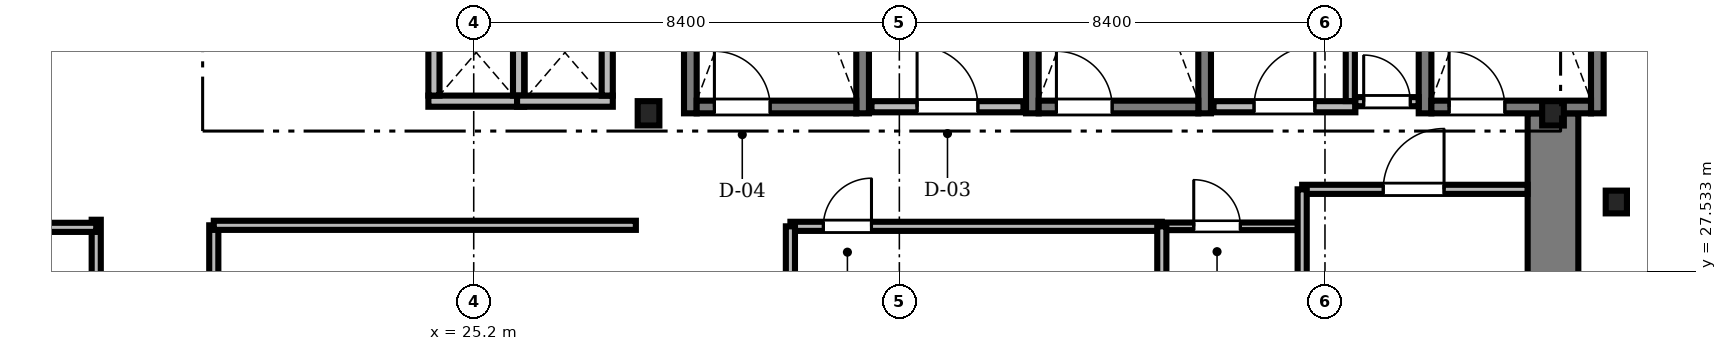
"""IFC4 building model, lengths in metres.
Left out: names, types, materials, properties, quantities, classifications, styles, units other than length and angle.
Written with IfcOpenShell. Run it as: python <this file> out.ifc"""

import sys

from ifc_helpers import new_model, si_unit, direction, frame, frame_2d, origin, origin_2d, place, context, subcontext, project, spatial, rectangle, i_section, extrude, source, transform, mapped, element, fill, save


model = new_model("IFC4")
c1 = context("Model", 3, precision=1e-05, world=origin(), true_north=direction((0.0, 1.0)))
c2 = subcontext(c1, "Body", "Model", "MODEL_VIEW")
j1 = project(units=[si_unit("LENGTHUNIT", "METRE"), si_unit("PLANEANGLEUNIT", "RADIAN")], contexts=[c1])
p1 = place(None, origin())
s1 = spatial("IfcSite", under=j1, at=p1, CompositionType="ELEMENT")
p2 = place(p1, origin())
s2 = spatial("IfcBuilding", under=s1, at=p2, CompositionType="ELEMENT")
p3 = place(p2, frame((0.0, 0.0, 27.6)))
s3 = spatial("IfcBuildingStorey", under=s2, at=p3, CompositionType="ELEMENT", Elevation=27.6)
m1 = source(origin(), c2, "Body", "SweptSolid", [
    extrude(rectangle(XDim=13.15, YDim=1.0, at=frame_2d((6.575, 0.0))), origin(), (0.0, 0.0, 1.0), 3.41),
])
p4 = place(p3, frame((46.5, 17.5, 0.0), z_axis=(0.0, 0.0, 1.0), x_axis=(0.0, 1.0, 0.0)))
e1 = element("IfcWall", 1, at=p4, inside=s3, PredefinedType="SHEAR", context=c2, shape_type="MappedRepresentation", body=[
    mapped(m1, transform((0.0, 0.0, 0.0), scale=1.0)),
])
m2 = source(origin(), c2, "Body", "SweptSolid", [
    extrude(i_section(OverallWidth=0.428, OverallDepth=0.481, WebThickness=0.04, FlangeThickness=0.063, FilletRadius=0.015, at=origin_2d()), origin(), (0.0, 0.0, 1.0), 3.41),
])
for number, where, z_axis, x_axis in (
    (2, (28.65, 30.65, 0.0), (0.0, 0.0, 1.0), (1.0, 0.0, 0.0)),
    (3, (46.5, 30.65, 0.0), (0.0, 0.0, 1.0), (1.0, 0.0, 0.0)),
):
    element("IfcColumn", number, at=place(p3, frame(where, z_axis=z_axis, x_axis=x_axis)), inside=s3, PredefinedType="COLUMN", context=c2, shape_type="MappedRepresentation", body=[
        mapped(m2, transform((0.0, 0.0, 0.0), scale=1.0)),
    ])
m3 = source(origin(), c2, "Body", "SweptSolid", [
    extrude(i_section(OverallWidth=0.419, OverallDepth=0.449, WebThickness=0.031, FlangeThickness=0.048, FilletRadius=0.015, at=origin_2d()), origin(), (0.0, 0.0, 1.0), 3.41),
])
p5 = place(p3, frame((47.75, 28.9, 0.0), z_axis=(0.0, 0.0, 1.0), x_axis=(1.0, 0.0, 0.0)))
e4 = element("IfcColumn", 4, at=p5, inside=s3, PredefinedType="COLUMN", context=c2, shape_type="MappedRepresentation", body=[
    mapped(m3, transform((0.0, 0.0, 0.0), scale=1.0)),
])
m4 = source(origin(), c2, "Body", "SweptSolid", [
    extrude(rectangle(XDim=9.15, YDim=0.25, at=frame_2d((4.575, 0.0))), origin(), (0.0, 0.0, 1.0), 3.45),
])
for number, where, z_axis, x_axis in (
    (5, (29.475, 30.65, 0.0), (0.0, 0.0, 1.0), (0.0, 1.0, 0.0)),
    (6, (32.875, 30.65, 0.0), (0.0, 0.0, 1.0), (0.0, 1.0, 0.0)),
):
    element("IfcWall", number, at=place(p3, frame(where, z_axis=z_axis, x_axis=x_axis)), inside=s3, PredefinedType="SOLIDWALL", context=c2, shape_type="MappedRepresentation", body=[
        mapped(m4, transform((0.0, 0.0, 0.0), scale=1.0)),
    ])
m5 = source(origin(), c2, "Body", "SweptSolid", [
    extrude(rectangle(XDim=3.15, YDim=0.25, at=frame_2d((1.575, 0.0))), origin(), (0.0, 0.0, 1.0), 3.45),
])
p6 = place(p3, frame((29.6, 30.775, 0.0), z_axis=(0.0, 0.0, 1.0), x_axis=(1.0, 0.0, 0.0)))
e7 = element("IfcWall", 7, at=p6, inside=s3, PredefinedType="SOLIDWALL", context=c2, shape_type="MappedRepresentation", body=[
    mapped(m5, transform((0.0, 0.0, 0.0), scale=1.0)),
])
m6 = source(origin(), c2, "Body", "SweptSolid", [
    extrude(rectangle(XDim=1.1, YDim=2.2, at=frame_2d((0.55, 1.1))), frame((0.0, 0.135, 0.0), z_axis=(0.0, -1.0, 0.0), x_axis=(1.0, 0.0, 0.0)), (0.0, 0.0, 1.0), 0.27),
])
p7 = place(p6, frame((0.35, 0.0, 0.0)))
e8 = element("IfcOpeningElement", 8, at=p7, cuts=e7, PredefinedType="OPENING", context=c2, shape_type="MappedRepresentation", body=[
    mapped(m6, transform((0.0, 0.0, 0.0), scale=1.0)),
])
for number, where, z_axis, x_axis in (
    (9, (36.225, 30.65, 0.0), (0.0, 0.0, 1.0), (0.0, 1.0, 0.0)),
    (10, (39.625, 30.65, 0.0), (0.0, 0.0, 1.0), (0.0, 1.0, 0.0)),
):
    element("IfcWall", number, at=place(p3, frame(where, z_axis=z_axis, x_axis=x_axis)), inside=s3, PredefinedType="SOLIDWALL", context=c2, shape_type="MappedRepresentation", body=[
        mapped(m4, transform((0.0, 0.0, 0.0), scale=1.0)),
    ])
p8 = place(p3, frame((36.35, 30.775, 0.0), z_axis=(0.0, 0.0, 1.0), x_axis=(1.0, 0.0, 0.0)))
e11 = element("IfcWall", 11, at=p8, inside=s3, PredefinedType="SOLIDWALL", context=c2, shape_type="MappedRepresentation", body=[
    mapped(m5, transform((0.0, 0.0, 0.0), scale=1.0)),
])
p9 = place(p8, frame((0.35, 0.0, 0.0)))
e12 = element("IfcOpeningElement", 12, at=p9, cuts=e11, PredefinedType="OPENING", context=c2, shape_type="MappedRepresentation", body=[
    mapped(m6, transform((0.0, 0.0, 0.0), scale=1.0)),
])
for number, where, z_axis, x_axis in (
    (13, (43.975, 30.65, 0.0), (0.0, 0.0, 1.0), (0.0, 1.0, 0.0)),
    (14, (47.375, 30.65, 0.0), (0.0, 0.0, 1.0), (0.0, 1.0, 0.0)),
):
    element("IfcWall", number, at=place(p3, frame(where, z_axis=z_axis, x_axis=x_axis)), inside=s3, PredefinedType="SOLIDWALL", context=c2, shape_type="MappedRepresentation", body=[
        mapped(m4, transform((0.0, 0.0, 0.0), scale=1.0)),
    ])
p10 = place(p3, frame((44.1, 30.775, 0.0), z_axis=(0.0, 0.0, 1.0), x_axis=(1.0, 0.0, 0.0)))
e15 = element("IfcWall", 15, at=p10, inside=s3, PredefinedType="SOLIDWALL", context=c2, shape_type="MappedRepresentation", body=[
    mapped(m5, transform((0.0, 0.0, 0.0), scale=1.0)),
])
p11 = place(p10, frame((0.35, 0.0, 0.0)))
e16 = element("IfcOpeningElement", 16, at=p11, cuts=e15, PredefinedType="OPENING", context=c2, shape_type="MappedRepresentation", body=[
    mapped(m6, transform((0.0, 0.0, 0.0), scale=1.0)),
])
m7 = source(origin(), c2, "Body", "SweptSolid", [
    extrude(rectangle(XDim=3.0, YDim=0.22, at=frame_2d((1.5, 0.0))), origin(), (0.0, 0.0, 1.0), 3.41),
])
p12 = place(p3, frame((33.05, 30.78, 0.0), z_axis=(0.0, 0.0, 1.0), x_axis=(1.0, 0.0, 0.0)))
e17 = element("IfcWall", 17, at=p12, inside=s3, PredefinedType="SOLIDWALL", context=c2, shape_type="MappedRepresentation", body=[
    mapped(m7, transform((0.0, 0.0, 0.0), scale=1.0)),
])
m8 = source(origin(), c2, "Body", "SweptSolid", [
    extrude(rectangle(XDim=1.2, YDim=2.2, at=frame_2d((0.6, 1.1))), frame((0.0, 0.12, 0.0), z_axis=(0.0, -1.0, 0.0), x_axis=(1.0, 0.0, 0.0)), (0.0, 0.0, 1.0), 0.24),
])
p13 = place(p12, frame((0.9, 0.0, 0.0)))
e18 = element("IfcOpeningElement", 18, at=p13, cuts=e17, PredefinedType="OPENING", context=c2, shape_type="MappedRepresentation", body=[
    mapped(m8, transform((0.0, 0.0, 0.0), scale=1.0)),
])
m9 = source(origin(), c2, "Body", "SweptSolid", [
    extrude(rectangle(XDim=2.8, YDim=0.22, at=frame_2d((1.4, 0.0))), origin(), (0.0, 0.0, 1.0), 3.41),
])
p14 = place(p3, frame((39.8, 30.78, 0.0), z_axis=(0.0, 0.0, 1.0), x_axis=(1.0, 0.0, 0.0)))
e19 = element("IfcWall", 19, at=p14, inside=s3, PredefinedType="SOLIDWALL", context=c2, shape_type="MappedRepresentation", body=[
    mapped(m9, transform((0.0, 0.0, 0.0), scale=1.0)),
])
p15 = place(p14, frame((0.8, 0.0, 0.0)))
e20 = element("IfcOpeningElement", 20, at=p15, cuts=e19, PredefinedType="OPENING", context=c2, shape_type="MappedRepresentation", body=[
    mapped(m8, transform((0.0, 0.0, 0.0), scale=1.0)),
])
m10 = source(origin(), c2, "Body", "SweptSolid", [
    extrude(rectangle(XDim=1.89, YDim=0.22, at=frame_2d((0.945, 0.0))), origin(), (0.0, 0.0, 1.0), 3.41),
])
p16 = place(p3, frame((24.305, 30.89, 0.0), z_axis=(0.0, 0.0, 1.0), x_axis=(1.0, 0.0, 0.0)))
e21 = element("IfcWall", 21, at=p16, inside=s3, PredefinedType="SOLIDWALL", context=c2, shape_type="MappedRepresentation", body=[
    mapped(m10, transform((0.0, 0.0, 0.0), scale=1.0)),
])
m11 = source(origin(), c2, "Body", "SweptSolid", [
    extrude(rectangle(XDim=1.7, YDim=0.22, at=frame_2d((0.85, 0.0))), origin(), (0.0, 0.0, 1.0), 3.41),
])
for number, where, z_axis, x_axis in (
    (22, (24.415, 31.0, 0.0), (0.0, 0.0, 1.0), (0.0, 1.0, 0.0)),
    (23, (26.085, 31.0, 0.0), (0.0, 0.0, 1.0), (0.0, 1.0, 0.0)),
):
    element("IfcWall", number, at=place(p3, frame(where, z_axis=z_axis, x_axis=x_axis)), inside=s3, PredefinedType="SOLIDWALL", context=c2, shape_type="MappedRepresentation", body=[
        mapped(m11, transform((0.0, 0.0, 0.0), scale=1.0)),
    ])
p17 = place(p3, frame((26.055, 30.89, 0.0), z_axis=(0.0, 0.0, 1.0), x_axis=(1.0, 0.0, 0.0)))
e24 = element("IfcWall", 24, at=p17, inside=s3, PredefinedType="SOLIDWALL", context=c2, shape_type="MappedRepresentation", body=[
    mapped(m10, transform((0.0, 0.0, 0.0), scale=1.0)),
])
p18 = place(p3, frame((27.835, 31.0, 0.0), z_axis=(0.0, 0.0, 1.0), x_axis=(0.0, 1.0, 0.0)))
e25 = element("IfcWall", 25, at=p18, inside=s3, PredefinedType="SOLIDWALL", context=c2, shape_type="MappedRepresentation", body=[
    mapped(m11, transform((0.0, 0.0, 0.0), scale=1.0)),
])
m12 = source(origin(), c2, "Body", "SweptSolid", [
    extrude(rectangle(XDim=13.89, YDim=0.18, at=frame_2d((6.945, 0.0))), origin(), (0.0, 0.0, 1.0), 2.802),
])
p19 = place(p3, frame((17.75, 14.66, 0.0), z_axis=(0.0, 0.0, 1.0), x_axis=(0.0, 1.0, 0.0)))
e26 = element("IfcWall", 26, at=p19, inside=s3, PredefinedType="PARTITIONING", context=c2, shape_type="MappedRepresentation", body=[
    mapped(m12, transform((0.0, 0.0, 0.0), scale=1.0)),
])
m13 = source(origin(), c2, "Body", "SweptSolid", [
    extrude(rectangle(XDim=1.05, YDim=2.2, at=frame_2d((0.525, 1.1))), frame((0.0, 0.1, 0.0), z_axis=(0.0, -1.0, 0.0), x_axis=(1.0, 0.0, 0.0)), (0.0, 0.0, 1.0), 0.2),
])
p20 = place(p19, frame((1.77, 0.0, 0.0)))
e27 = element("IfcOpeningElement", 27, at=p20, cuts=e26, PredefinedType="OPENING", context=c2, shape_type="MappedRepresentation", body=[
    mapped(m13, transform((0.0, 0.0, 0.0), scale=1.0)),
])
m14 = source(origin(), c2, "Body", "SweptSolid", [
    extrude(rectangle(XDim=0.95, YDim=2.15, at=frame_2d((0.475, 1.075))), frame((0.0, 0.1, 0.0), z_axis=(0.0, -1.0, 0.0), x_axis=(1.0, 0.0, 0.0)), (0.0, 0.0, 1.0), 0.2),
])
p21 = place(p19, frame((7.575, 0.0, 0.0)))
e28 = element("IfcOpeningElement", 28, at=p21, cuts=e26, PredefinedType="OPENING", context=c2, shape_type="MappedRepresentation", body=[
    mapped(m14, transform((0.0, 0.0, 0.0), scale=1.0)),
])
p22 = place(p19, frame((10.93, 0.0, 0.0)))
e29 = element("IfcOpeningElement", 29, at=p22, cuts=e26, PredefinedType="OPENING", context=c2, shape_type="MappedRepresentation", body=[
    mapped(m13, transform((0.0, 0.0, 0.0), scale=1.0)),
])
m15 = source(origin(), c2, "Body", "SweptSolid", [
    extrude(rectangle(XDim=11.94, YDim=0.18, at=frame_2d((5.97, 0.0))), origin(), (0.0, 0.0, 1.0), 2.802),
])
p23 = place(p3, frame((20.07, 16.5, 0.0), z_axis=(0.0, 0.0, 1.0), x_axis=(0.0, 1.0, 0.0)))
e30 = element("IfcWall", 30, at=p23, inside=s3, PredefinedType="PARTITIONING", context=c2, shape_type="MappedRepresentation", body=[
    mapped(m15, transform((0.0, 0.0, 0.0), scale=1.0)),
])
p24 = place(p23, frame((4.5, 0.0, 0.0)))
e31 = element("IfcOpeningElement", 31, at=p24, cuts=e30, PredefinedType="OPENING", context=c2, shape_type="MappedRepresentation", body=[
    mapped(m13, transform((0.0, 0.0, 0.0), scale=1.0)),
])
m16 = source(origin(), c2, "Body", "SweptSolid", [
    extrude(rectangle(XDim=7.33, YDim=0.18, at=frame_2d((3.665, 0.0))), origin(), (0.0, 0.0, 1.0), 3.042),
])
p25 = place(p3, frame((31.45, 28.42, 0.0), z_axis=(0.0, 0.0, 1.0), x_axis=(1.0, 0.0, 0.0)))
e32 = element("IfcWall", 32, at=p25, inside=s3, PredefinedType="PARTITIONING", context=c2, shape_type="MappedRepresentation", body=[
    mapped(m16, transform((0.0, 0.0, 0.0), scale=1.0)),
])
p26 = place(p25, frame((0.65, 0.0, 0.0)))
e33 = element("IfcOpeningElement", 33, at=p26, cuts=e32, PredefinedType="OPENING", context=c2, shape_type="MappedRepresentation", body=[
    mapped(m14, transform((0.0, 0.0, 0.0), scale=1.0)),
])
m17 = source(origin(), c2, "Body", "SweptSolid", [
    extrude(rectangle(XDim=4.448, YDim=0.18, at=frame_2d((2.224, 0.0))), origin(), (0.0, 0.0, 1.0), 3.042),
])
p27 = place(p3, frame((41.55, 29.15, 0.0), z_axis=(0.0, 0.0, 1.0), x_axis=(1.0, 0.0, 0.0)))
e34 = element("IfcWall", 34, at=p27, inside=s3, PredefinedType="PARTITIONING", context=c2, shape_type="MappedRepresentation", body=[
    mapped(m17, transform((0.0, 0.0, 0.0), scale=1.0)),
])
m18 = source(origin(), c2, "Body", "SweptSolid", [
    extrude(rectangle(XDim=1.2, YDim=2.2, at=frame_2d((0.6, 1.1))), frame((0.0, 0.1, 0.0), z_axis=(0.0, -1.0, 0.0), x_axis=(1.0, 0.0, 0.0)), (0.0, 0.0, 1.0), 0.2),
])
p28 = place(p27, frame((1.6, 0.0, 0.0)))
e35 = element("IfcOpeningElement", 35, at=p28, cuts=e34, PredefinedType="OPENING", context=c2, shape_type="MappedRepresentation", body=[
    mapped(m18, transform((0.0, 0.0, 0.0), scale=1.0)),
])
m19 = source(origin(), c2, "Body", "SweptSolid", [
    extrude(rectangle(XDim=2.74, YDim=0.15, at=frame_2d((1.37, 0.0))), origin(), (0.0, 0.0, 1.0), 3.41),
])
p29 = place(p3, frame((38.78, 28.42, 0.0), z_axis=(0.0, 0.0, 1.0), x_axis=(1.0, 0.0, 0.0)))
e36 = element("IfcWall", 36, at=p29, inside=s3, PredefinedType="PARTITIONING", context=c2, shape_type="MappedRepresentation", body=[
    mapped(m19, transform((0.0, 0.0, 0.0), scale=1.0)),
])
m20 = source(origin(), c2, "Body", "SweptSolid", [
    extrude(rectangle(XDim=0.92, YDim=2.1, at=frame_2d((0.46, 1.05))), frame((0.0, 0.085, 0.0), z_axis=(0.0, -1.0, 0.0), x_axis=(1.0, 0.0, 0.0)), (0.0, 0.0, 1.0), 0.17),
])
p30 = place(p29, frame((0.63, 0.0, 0.0)))
e37 = element("IfcOpeningElement", 37, at=p30, cuts=e36, PredefinedType="OPENING", context=c2, shape_type="MappedRepresentation", body=[
    mapped(m20, transform((0.0, 0.0, 0.0), scale=1.0)),
])
m21 = source(origin(), c2, "Body", "SweptSolid", [
    extrude(rectangle(XDim=1.248, YDim=0.18, at=frame_2d((0.624, 0.0))), origin(), (0.0, 0.0, 1.0), 3.41),
])
p31 = place(p3, frame((42.6, 30.88, 0.0), z_axis=(0.0, 0.0, 1.0), x_axis=(1.0, 0.0, 0.0)))
e38 = element("IfcWall", 38, at=p31, inside=s3, PredefinedType="PARTITIONING", context=c2, shape_type="MappedRepresentation", body=[
    mapped(m21, transform((0.0, 0.0, 0.0), scale=1.0)),
])
m22 = source(origin(), c2, "Body", "SweptSolid", [
    extrude(rectangle(XDim=0.92, YDim=2.1, at=frame_2d((0.46, 1.05))), frame((0.0, 0.1, 0.0), z_axis=(0.0, -1.0, 0.0), x_axis=(1.0, 0.0, 0.0)), (0.0, 0.0, 1.0), 0.2),
])
p32 = place(p31, frame((0.164, 0.0, 0.0)))
e39 = element("IfcOpeningElement", 39, at=p32, cuts=e38, PredefinedType="OPENING", context=c2, shape_type="MappedRepresentation", body=[
    mapped(m22, transform((0.0, 0.0, 0.0), scale=1.0)),
])
m23 = source(origin(), c2, "Body", "SweptSolid", [
    extrude(rectangle(XDim=15.52, YDim=0.18, at=frame_2d((7.76, 0.0))), origin(), (0.0, 0.0, 1.0), 2.652),
])
p33 = place(p3, frame((2.23, 28.4, 0.0), z_axis=(0.0, 0.0, 1.0), x_axis=(1.0, 0.0, 0.0)))
e40 = element("IfcWall", 40, at=p33, inside=s3, PredefinedType="PARTITIONING", context=c2, shape_type="MappedRepresentation", body=[
    mapped(m23, transform((0.0, 0.0, 0.0), scale=1.0)),
])
m24 = source(origin(), c2, "Body", "SweptSolid", [
    extrude(rectangle(XDim=8.33, YDim=0.18, at=frame_2d((4.165, 0.0))), origin(), (0.0, 0.0, 1.0), 3.41),
])
p34 = place(p3, frame((20.07, 28.44, 0.0), z_axis=(0.0, 0.0, 1.0), x_axis=(1.0, 0.0, 0.0)))
e41 = element("IfcWall", 41, at=p34, inside=s3, PredefinedType="PARTITIONING", context=c2, shape_type="MappedRepresentation", body=[
    mapped(m24, transform((0.0, 0.0, 0.0), scale=1.0)),
])
m25 = source(origin(), c2, "Body", "SweptSolid", [
    extrude(rectangle(XDim=2.758, YDim=0.18, at=frame_2d((1.379, 0.0))), origin(), (0.0, 0.0, 1.0), 3.41),
])
p35 = place(p3, frame((42.5, 30.892, 0.0), z_axis=(0.0, 0.0, 1.0), x_axis=(0.0, 1.0, 0.0)))
e42 = element("IfcWall", 42, at=p35, inside=s3, PredefinedType="PARTITIONING", context=c2, shape_type="MappedRepresentation", body=[
    mapped(m25, transform((0.0, 0.0, 0.0), scale=1.0)),
])
m26 = source(origin(), c2, "Body", "SweptSolid", [
    extrude(rectangle(XDim=2.35, YDim=0.18, at=frame_2d((1.175, 0.0))), origin(), (0.0, 0.0, 1.0), 2.802),
])
p36 = place(p3, frame((41.55, 26.8, 0.0), z_axis=(0.0, 0.0, 1.0), x_axis=(0.0, 1.0, 0.0)))
e43 = element("IfcWall", 43, at=p36, inside=s3, PredefinedType="PARTITIONING", context=c2, shape_type="MappedRepresentation", body=[
    mapped(m26, transform((0.0, 0.0, 0.0), scale=1.0)),
])
m27 = source(origin(), c2, "Body", "SweptSolid", [
    extrude(rectangle(XDim=1.6, YDim=0.18, at=frame_2d((0.8, 0.0))), origin(), (0.0, 0.0, 1.0), 2.952),
])
for number, where, z_axis, x_axis in (
    (44, (31.45, 26.82, 0.0), (0.0, 0.0, 1.0), (0.0, 1.0, 0.0)),
    (45, (38.78, 26.82, 0.0), (0.0, 0.0, 1.0), (0.0, 1.0, 0.0)),
):
    element("IfcWall", number, at=place(p3, frame(where, z_axis=z_axis, x_axis=x_axis)), inside=s3, PredefinedType="PARTITIONING", context=c2, shape_type="MappedRepresentation", body=[
        mapped(m27, transform((0.0, 0.0, 0.0), scale=1.0)),
    ])
m28 = source(origin(), c2, "Body", "SweptSolid", [
    extrude(rectangle(XDim=1.1, YDim=2.2, at=frame_2d((0.55, 1.1))), frame((0.0, 0.025, 0.0), z_axis=(0.0, -1.0, 0.0), x_axis=(1.0, 0.0, 0.0)), (0.0, 0.0, 1.0), 0.05),
])
p37 = place(p7, origin())
e46 = element("IfcDoor", 46, at=p37, inside=s3, OperationType="SINGLE_SWING_LEFT", PredefinedType="DOOR", context=c2, shape_type="MappedRepresentation", body=[
    mapped(m28, transform((0.0, 0.0, 0.0), scale=1.0)),
])
fill(e8, e46)
p38 = place(p9, origin())
e47 = element("IfcDoor", 47, at=p38, inside=s3, OperationType="SINGLE_SWING_LEFT", PredefinedType="DOOR", context=c2, shape_type="MappedRepresentation", body=[
    mapped(m28, transform((0.0, 0.0, 0.0), scale=1.0)),
])
fill(e12, e47)
p39 = place(p11, origin())
e48 = element("IfcDoor", 48, at=p39, inside=s3, OperationType="SINGLE_SWING_LEFT", PredefinedType="DOOR", context=c2, shape_type="MappedRepresentation", body=[
    mapped(m28, transform((0.0, 0.0, 0.0), scale=1.0)),
])
fill(e16, e48)
m29 = source(origin(), c2, "Body", "SweptSolid", [
    extrude(rectangle(XDim=1.2, YDim=2.2, at=frame_2d((0.6, 1.1))), frame((0.0, 0.025, 0.0), z_axis=(0.0, -1.0, 0.0), x_axis=(1.0, 0.0, 0.0)), (0.0, 0.0, 1.0), 0.05),
])
p40 = place(p13, origin())
e49 = element("IfcDoor", 49, at=p40, inside=s3, OperationType="SINGLE_SWING_LEFT", PredefinedType="DOOR", context=c2, shape_type="MappedRepresentation", body=[
    mapped(m29, transform((0.0, 0.0, 0.0), scale=1.0)),
])
fill(e18, e49)
p41 = place(p15, origin())
e50 = element("IfcDoor", 50, at=p41, inside=s3, OperationType="SINGLE_SWING_RIGHT", PredefinedType="DOOR", context=c2, shape_type="MappedRepresentation", body=[
    mapped(m29, transform((0.0, 0.0, 0.0), scale=1.0)),
])
fill(e20, e50)
m30 = source(origin(), c2, "Body", "SweptSolid", [
    extrude(rectangle(XDim=0.95, YDim=2.15, at=frame_2d((0.475, 1.075))), frame((0.0, 0.025, 0.0), z_axis=(0.0, -1.0, 0.0), x_axis=(1.0, 0.0, 0.0)), (0.0, 0.0, 1.0), 0.05),
])
p42 = place(p26, origin())
e51 = element("IfcDoor", 51, at=p42, inside=s3, OperationType="SINGLE_SWING_RIGHT", PredefinedType="DOOR", context=c2, shape_type="MappedRepresentation", body=[
    mapped(m30, transform((0.0, 0.0, 0.0), scale=1.0)),
])
fill(e33, e51)
p43 = place(p28, origin())
e52 = element("IfcDoor", 52, at=p43, inside=s3, OperationType="SINGLE_SWING_RIGHT", PredefinedType="DOOR", context=c2, shape_type="MappedRepresentation", body=[
    mapped(m29, transform((0.0, 0.0, 0.0), scale=1.0)),
])
fill(e35, e52)
m31 = source(origin(), c2, "Body", "SweptSolid", [
    extrude(rectangle(XDim=0.92, YDim=2.1, at=frame_2d((0.46, 1.05))), frame((0.0, 0.025, 0.0), z_axis=(0.0, -1.0, 0.0), x_axis=(1.0, 0.0, 0.0)), (0.0, 0.0, 1.0), 0.05),
])
p44 = place(p30, origin())
e53 = element("IfcDoor", 53, at=p44, inside=s3, OperationType="SINGLE_SWING_LEFT", PredefinedType="DOOR", context=c2, shape_type="MappedRepresentation", body=[
    mapped(m31, transform((0.0, 0.0, 0.0), scale=1.0)),
])
fill(e37, e53)
p45 = place(p32, origin())
e54 = element("IfcDoor", 54, at=p45, inside=s3, OperationType="SINGLE_SWING_LEFT", PredefinedType="DOOR", context=c2, shape_type="MappedRepresentation", body=[
    mapped(m31, transform((0.0, 0.0, 0.0), scale=1.0)),
])
fill(e39, e54)
save(model, sys.argv[1])
